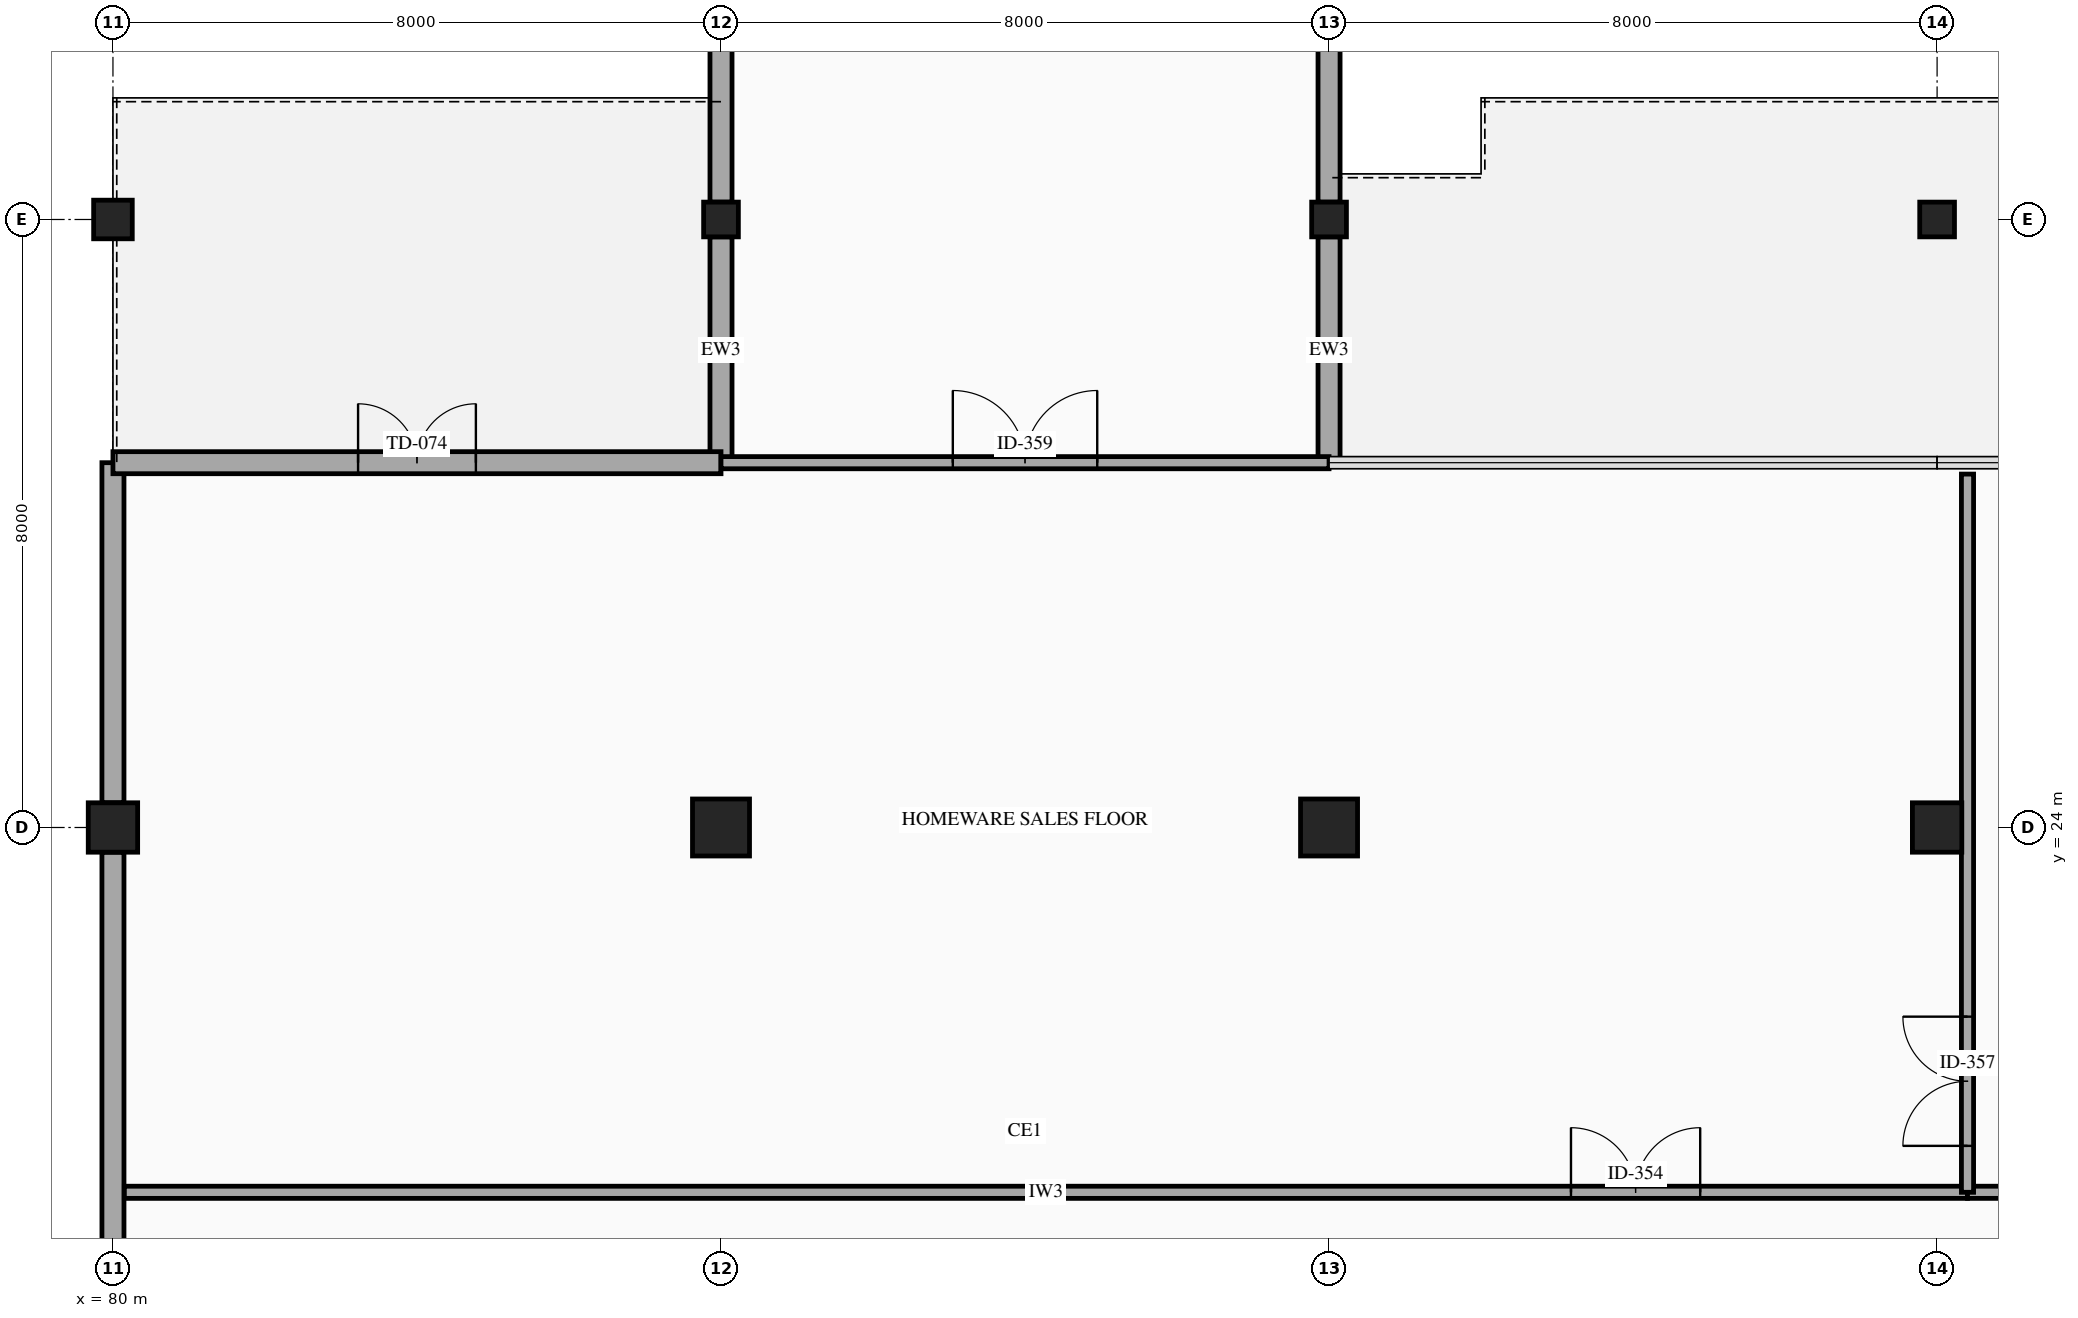
"""IFC4 building model, lengths in metres.
Left out: names, types, materials, properties, quantities, classifications, styles, units other than length and angle.
Written with IfcOpenShell. Run it as: python <this file> out.ifc"""

import sys

from ifc_helpers import new_model, si_unit, direction, frame, frame_2d, origin, origin_2d, place, context, subcontext, project, spatial, rectangle, hollow_circle, extrude, element, fill, save


model = new_model("IFC4")
c1 = context("Model", 3, precision=1e-05, world=origin(), true_north=direction((0.0, 1.0)))
c2 = subcontext(c1, "Body", "Model", "MODEL_VIEW")
j1 = project(units=[si_unit("LENGTHUNIT", "METRE"), si_unit("PLANEANGLEUNIT", "RADIAN")], contexts=[c1])
p1 = place(None, origin())
s1 = spatial("IfcSite", under=j1, at=p1, CompositionType="ELEMENT")
p2 = place(p1, origin())
s2 = spatial("IfcBuilding", under=s1, at=p2, CompositionType="ELEMENT")
p3 = place(p2, frame((0.0, 0.0, 19.4)))
s3 = spatial("IfcBuildingStorey", under=s2, at=p3, CompositionType="ELEMENT", Elevation=19.4)
p4 = place(p3, frame((80.0, 24.0, 0.0), z_axis=(0.0, 0.0, 1.0), x_axis=(1.0, 0.0, 0.0)))
e1 = element("IfcColumn", 1, at=p4, inside=s3, PredefinedType="COLUMN", context=c2, shape_type="SweptSolid", body=[
    extrude(rectangle(XDim=0.65, YDim=0.65, at=origin_2d()), origin(), (0.0, 0.0, 1.0), 4.5),
])
p5 = place(p3, frame((80.0, 32.0, 0.0), z_axis=(0.0, 0.0, 1.0), x_axis=(1.0, 0.0, 0.0)))
e2 = element("IfcColumn", 2, at=p5, inside=s3, PredefinedType="COLUMN", context=c2, shape_type="SweptSolid", body=[
    extrude(hollow_circle(Radius=0.254, WallThickness=0.012, at=origin_2d()), origin(), (0.0, 0.0, 1.0), 4.5),
])
p6 = place(p3, frame((88.0, 24.0, 0.0), z_axis=(0.0, 0.0, 1.0), x_axis=(1.0, 0.0, 0.0)))
e3 = element("IfcColumn", 3, at=p6, inside=s3, PredefinedType="COLUMN", context=c2, shape_type="SweptSolid", body=[
    extrude(rectangle(XDim=0.75, YDim=0.75, at=origin_2d()), origin(), (0.0, 0.0, 1.0), 4.5),
])
p7 = place(p3, frame((88.0, 32.0, 0.0), z_axis=(0.0, 0.0, 1.0), x_axis=(1.0, 0.0, 0.0)))
e4 = element("IfcColumn", 4, at=p7, inside=s3, PredefinedType="COLUMN", context=c2, shape_type="SweptSolid", body=[
    extrude(hollow_circle(Radius=0.229, WallThickness=0.012, at=origin_2d()), origin(), (0.0, 0.0, 1.0), 4.5),
])
p8 = place(p3, frame((96.0, 24.0, 0.0), z_axis=(0.0, 0.0, 1.0), x_axis=(1.0, 0.0, 0.0)))
e5 = element("IfcColumn", 5, at=p8, inside=s3, PredefinedType="COLUMN", context=c2, shape_type="SweptSolid", body=[
    extrude(rectangle(XDim=0.75, YDim=0.75, at=origin_2d()), origin(), (0.0, 0.0, 1.0), 4.5),
])
p9 = place(p3, frame((96.0, 32.0, 0.0), z_axis=(0.0, 0.0, 1.0), x_axis=(1.0, 0.0, 0.0)))
e6 = element("IfcColumn", 6, at=p9, inside=s3, PredefinedType="COLUMN", context=c2, shape_type="SweptSolid", body=[
    extrude(hollow_circle(Radius=0.229, WallThickness=0.012, at=origin_2d()), origin(), (0.0, 0.0, 1.0), 4.5),
])
p10 = place(p3, frame((104.0, 24.0, 0.0), z_axis=(0.0, 0.0, 1.0), x_axis=(1.0, 0.0, 0.0)))
e7 = element("IfcColumn", 7, at=p10, inside=s3, PredefinedType="COLUMN", context=c2, shape_type="SweptSolid", body=[
    extrude(rectangle(XDim=0.65, YDim=0.65, at=origin_2d()), origin(), (0.0, 0.0, 1.0), 4.5),
])
p11 = place(p3, frame((104.0, 32.0, 0.0), z_axis=(0.0, 0.0, 1.0), x_axis=(1.0, 0.0, 0.0)))
e8 = element("IfcColumn", 8, at=p11, inside=s3, PredefinedType="COLUMN", context=c2, shape_type="SweptSolid", body=[
    extrude(hollow_circle(Radius=0.229, WallThickness=0.012, at=origin_2d()), origin(), (0.0, 0.0, 1.0), 4.5),
])
p12 = place(p3, frame((88.0, 28.8, 0.0), z_axis=(0.0, 0.0, 1.0), x_axis=(0.0, 1.0, 0.0)))
e9 = element("IfcWall", 9, at=p12, inside=s3, PredefinedType="STANDARD", context=c2, shape_type="SweptSolid", body=[
    extrude(rectangle(XDim=2.971, YDim=0.29, at=frame_2d((1.486, 0.0))), origin(), (0.0, 0.0, 1.0), 3.48),
])
p13 = place(p3, frame((88.0, 32.229, 0.0), z_axis=(0.0, 0.0, 1.0), x_axis=(0.0, 1.0, 0.0)))
e10 = element("IfcWall", 10, at=p13, inside=s3, PredefinedType="STANDARD", context=c2, shape_type="SweptSolid", body=[
    extrude(rectangle(XDim=7.396, YDim=0.29, at=frame_2d((3.698, 0.0))), origin(), (0.0, 0.0, 1.0), 3.48),
])
p14 = place(p13, frame((2.673, 0.0, 0.8)))
e11 = element("IfcOpeningElement", 11, at=p14, cuts=e10, PredefinedType="OPENING", context=c2, shape_type="SweptSolid", body=[
    extrude(rectangle(XDim=2.05, YDim=1.95, at=frame_2d((1.025, 0.975))), frame((0.0, 0.155, 0.0), z_axis=(0.0, -1.0, 0.0), x_axis=(1.0, 0.0, 0.0)), (0.0, 0.0, 1.0), 0.31),
])
p15 = place(p3, frame((96.0, 39.625, 0.0), z_axis=(0.0, 0.0, 1.0), x_axis=(0.0, -1.0, 0.0)))
e12 = element("IfcWall", 12, at=p15, inside=s3, PredefinedType="STANDARD", context=c2, shape_type="SweptSolid", body=[
    extrude(rectangle(XDim=7.396, YDim=0.29, at=frame_2d((3.698, 0.0))), origin(), (0.0, 0.0, 1.0), 3.48),
])
p16 = place(p15, frame((2.673, 0.0, 0.8)))
e13 = element("IfcOpeningElement", 13, at=p16, cuts=e12, PredefinedType="OPENING", context=c2, shape_type="SweptSolid", body=[
    extrude(rectangle(XDim=2.05, YDim=1.95, at=frame_2d((1.025, 0.975))), frame((0.0, 0.155, 0.0), z_axis=(0.0, -1.0, 0.0), x_axis=(1.0, 0.0, 0.0)), (0.0, 0.0, 1.0), 0.31),
])
p17 = place(p3, frame((96.0, 31.771, 0.0), z_axis=(0.0, 0.0, 1.0), x_axis=(0.0, -1.0, 0.0)))
e14 = element("IfcWall", 14, at=p17, inside=s3, PredefinedType="STANDARD", context=c2, shape_type="SweptSolid", body=[
    extrude(rectangle(XDim=2.971, YDim=0.29, at=frame_2d((1.486, 0.0))), origin(), (0.0, 0.0, 1.0), 3.48),
])
p18 = place(p3, frame((80.0, 16.375, 0.0), z_axis=(0.0, 0.0, 1.0), x_axis=(0.0, 1.0, 0.0)))
e15 = element("IfcWall", 15, at=p18, inside=s3, PredefinedType="STANDARD", context=c2, shape_type="SweptSolid", body=[
    extrude(rectangle(XDim=7.3, YDim=0.29, at=frame_2d((3.65, 0.0))), origin(), (0.0, 0.0, 1.0), 3.48),
])
p19 = place(p3, frame((80.0, 24.325, 0.0), z_axis=(0.0, 0.0, 1.0), x_axis=(0.0, 1.0, 0.0)))
e16 = element("IfcWall", 16, at=p19, inside=s3, PredefinedType="STANDARD", context=c2, shape_type="SweptSolid", body=[
    extrude(rectangle(XDim=4.475, YDim=0.29, at=frame_2d((2.238, 0.0))), origin(), (0.0, 0.0, 1.0), 3.48),
])
p20 = place(p3, frame((80.0, 28.8, 0.0), z_axis=(0.0, 0.0, 1.0), x_axis=(1.0, 0.0, 0.0)))
e17 = element("IfcWall", 17, at=p20, inside=s3, PredefinedType="STANDARD", context=c2, shape_type="SweptSolid", body=[
    extrude(rectangle(XDim=8.0, YDim=0.29, at=frame_2d((4.0, 0.0))), origin(), (0.0, 0.0, 1.0), 3.48),
])
p21 = place(p20, frame((3.225, 0.0, 0.0)))
e18 = element("IfcOpeningElement", 18, at=p21, cuts=e17, PredefinedType="OPENING", context=c2, shape_type="SweptSolid", body=[
    extrude(rectangle(XDim=1.55, YDim=2.15, at=frame_2d((0.775, 1.075))), frame((0.0, 0.155, 0.0), z_axis=(0.0, -1.0, 0.0), x_axis=(1.0, 0.0, 0.0)), (0.0, 0.0, 1.0), 0.31),
])
p22 = place(p3, frame((80.15, 19.2, 0.0), z_axis=(0.0, 0.0, 1.0), x_axis=(1.0, 0.0, 0.0)))
e19 = element("IfcWall", 19, at=p22, inside=s3, PredefinedType="PARTITIONING", context=c2, shape_type="SweptSolid", body=[
    extrude(rectangle(XDim=24.25, YDim=0.16, at=frame_2d((12.125, 0.0))), origin(), (0.0, 0.0, 1.0), 3.48),
])
p23 = place(p22, frame((19.033, 0.0, 0.0)))
e20 = element("IfcOpeningElement", 20, at=p23, cuts=e19, PredefinedType="OPENING", context=c2, shape_type="SweptSolid", body=[
    extrude(rectangle(XDim=1.7, YDim=2.25, at=frame_2d((0.85, 1.125))), frame((0.0, 0.09, 0.0), z_axis=(0.0, -1.0, 0.0), x_axis=(1.0, 0.0, 0.0)), (0.0, 0.0, 1.0), 0.18),
])
p24 = place(p3, frame((104.4, 19.2, 0.0), z_axis=(0.0, 0.0, 1.0), x_axis=(1.0, 0.0, 0.0)))
e21 = element("IfcWall", 21, at=p24, inside=s3, PredefinedType="PARTITIONING", context=c2, shape_type="SweptSolid", body=[
    extrude(rectangle(XDim=20.0, YDim=0.16, at=frame_2d((10.0, 0.0))), origin(), (0.0, 0.0, 1.0), 3.48),
])
p25 = place(p24, frame((2.82, 0.0, 0.0)))
e22 = element("IfcOpeningElement", 22, at=p25, cuts=e21, PredefinedType="OPENING", context=c2, shape_type="SweptSolid", body=[
    extrude(rectangle(XDim=1.7, YDim=2.25, at=frame_2d((0.85, 1.125))), frame((0.0, 0.09, 0.0), z_axis=(0.0, -1.0, 0.0), x_axis=(1.0, 0.0, 0.0)), (0.0, 0.0, 1.0), 0.18),
])
p26 = place(p3, frame((104.4, 19.2, 0.0), z_axis=(0.0, 0.0, 1.0), x_axis=(0.0, 1.0, 0.0)))
e23 = element("IfcWall", 23, at=p26, inside=s3, PredefinedType="PARTITIONING", context=c2, shape_type="SweptSolid", body=[
    extrude(rectangle(XDim=9.45, YDim=0.16, at=frame_2d((4.725, 0.0))), origin(), (0.0, 0.0, 1.0), 3.48),
])
p27 = place(p26, frame((0.611, 0.0, 0.0)))
e24 = element("IfcOpeningElement", 24, at=p27, cuts=e23, PredefinedType="OPENING", context=c2, shape_type="SweptSolid", body=[
    extrude(rectangle(XDim=1.7, YDim=2.25, at=frame_2d((0.85, 1.125))), frame((0.0, 0.09, 0.0), z_axis=(0.0, -1.0, 0.0), x_axis=(1.0, 0.0, 0.0)), (0.0, 0.0, 1.0), 0.18),
])
p28 = place(p3, frame((88.0, 28.8, 0.0), z_axis=(0.0, 0.0, 1.0), x_axis=(1.0, 0.0, 0.0)))
e25 = element("IfcWall", 25, at=p28, inside=s3, PredefinedType="PARTITIONING", context=c2, shape_type="SweptSolid", body=[
    extrude(rectangle(XDim=8.0, YDim=0.16, at=frame_2d((4.0, 0.0))), origin(), (0.0, 0.0, 1.0), 3.48),
])
p29 = place(p28, frame((3.05, 0.0, 0.0)))
e26 = element("IfcOpeningElement", 26, at=p29, cuts=e25, PredefinedType="OPENING", context=c2, shape_type="SweptSolid", body=[
    extrude(rectangle(XDim=1.9, YDim=2.3, at=frame_2d((0.95, 1.15))), frame((0.0, 0.09, 0.0), z_axis=(0.0, -1.0, 0.0), x_axis=(1.0, 0.0, 0.0)), (0.0, 0.0, 1.0), 0.18),
])
p30 = place(p21, origin())
e27 = element("IfcDoor", 27, at=p30, inside=s3, OperationType="DOUBLE_DOOR_SINGLE_SWING", PredefinedType="DOOR", context=c2, shape_type="SweptSolid", body=[
    extrude(rectangle(XDim=1.55, YDim=2.15, at=frame_2d((0.775, 1.075))), frame((0.0, 0.025, 0.0), z_axis=(0.0, -1.0, 0.0), x_axis=(1.0, 0.0, 0.0)), (0.0, 0.0, 1.0), 0.05),
])
fill(e18, e27)
p31 = place(p23, origin())
e28 = element("IfcDoor", 28, at=p31, inside=s3, OperationType="DOUBLE_DOOR_SINGLE_SWING", PredefinedType="DOOR", context=c2, shape_type="SweptSolid", body=[
    extrude(rectangle(XDim=1.7, YDim=2.25, at=frame_2d((0.85, 1.125))), frame((0.0, 0.025, 0.0), z_axis=(0.0, -1.0, 0.0), x_axis=(1.0, 0.0, 0.0)), (0.0, 0.0, 1.0), 0.05),
])
fill(e20, e28)
p32 = place(p27, origin())
e29 = element("IfcDoor", 29, at=p32, inside=s3, OperationType="DOUBLE_DOOR_SINGLE_SWING", PredefinedType="DOOR", context=c2, shape_type="SweptSolid", body=[
    extrude(rectangle(XDim=1.7, YDim=2.25, at=frame_2d((0.85, 1.125))), frame((0.0, 0.025, 0.0), z_axis=(0.0, -1.0, 0.0), x_axis=(1.0, 0.0, 0.0)), (0.0, 0.0, 1.0), 0.05),
])
fill(e24, e29)
p33 = place(p29, origin())
e30 = element("IfcDoor", 30, at=p33, inside=s3, OperationType="DOUBLE_DOOR_SINGLE_SWING", PredefinedType="DOOR", context=c2, shape_type="SweptSolid", body=[
    extrude(rectangle(XDim=1.9, YDim=2.3, at=frame_2d((0.95, 1.15))), frame((0.0, 0.025, 0.0), z_axis=(0.0, -1.0, 0.0), x_axis=(1.0, 0.0, 0.0)), (0.0, 0.0, 1.0), 0.05),
])
fill(e26, e30)
save(model, sys.argv[1])
